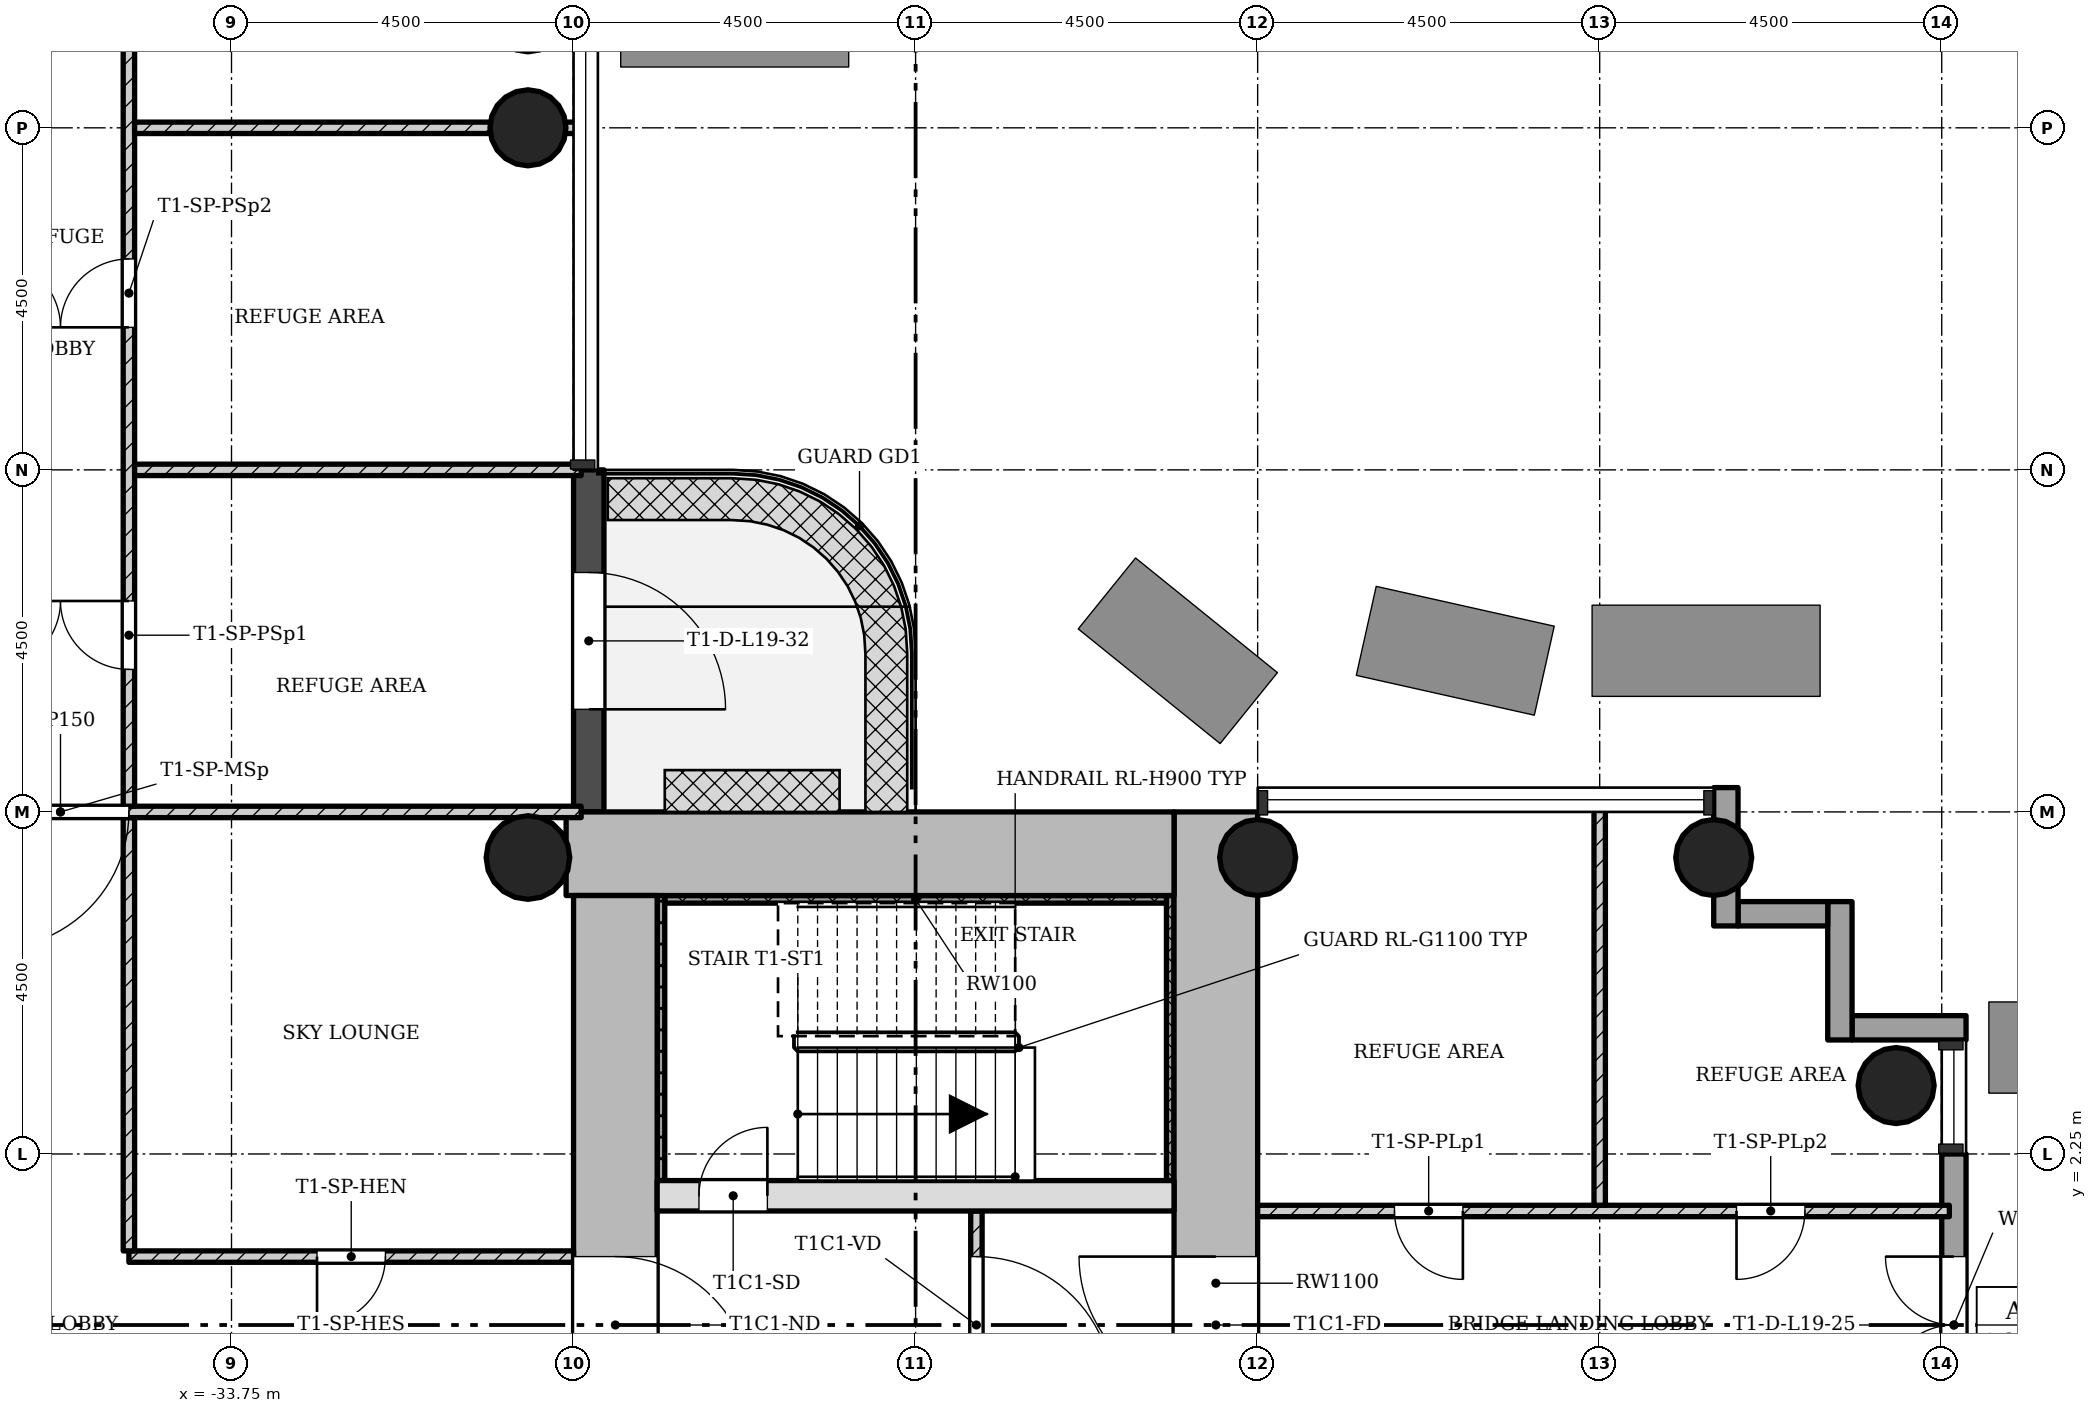
"""IFC4 building model, lengths in metres.
Left out: names, types, materials, properties, quantities, classifications, styles, units other than length and angle.
Written with IfcOpenShell. Run it as: python <this file> out.ifc"""

import sys

from ifc_helpers import new_model, si_unit, direction, frame, frame_2d, origin, origin_2d, place, context, subcontext, project, spatial, rectangle, hollow_circle, extrude, element, fill, save


model = new_model("IFC4")
c1 = context("Model", 3, precision=1e-05, world=origin(), true_north=direction((0.0, 1.0)))
c2 = subcontext(c1, "Body", "Model", "MODEL_VIEW")
j1 = project(units=[si_unit("LENGTHUNIT", "METRE"), si_unit("PLANEANGLEUNIT", "RADIAN")], contexts=[c1])
p1 = place(None, origin())
s1 = spatial("IfcSite", under=j1, at=p1, CompositionType="ELEMENT")
p2 = place(p1, origin())
s2 = spatial("IfcBuilding", under=s1, at=p2, CompositionType="ELEMENT")
p3 = place(p2, frame((0.0, 0.0, 72.1)))
s3 = spatial("IfcBuildingStorey", under=s2, at=p3, CompositionType="ELEMENT", Elevation=72.1)
p4 = place(p3, frame((-20.8, -5.65, 0.0), z_axis=(0.0, 0.0, 1.0), x_axis=(0.0, 1.0, 0.0)))
e1 = element("IfcWall", 1, at=p4, inside=s3, PredefinedType="SHEAR", context=c2, shape_type="SweptSolid", body=[
    extrude(rectangle(XDim=12.4, YDim=1.1, at=frame_2d((6.2, 0.0))), origin(), (0.0, 0.0, 1.0), 4.5),
])
p5 = place(p4, frame((4.75, 0.0, 0.0)))
e2 = element("IfcOpeningElement", 2, at=p5, cuts=e1, PredefinedType="OPENING", context=c2, shape_type="SweptSolid", body=[
    extrude(rectangle(XDim=1.8, YDim=2.1, at=frame_2d((0.9, 1.05))), frame((0.0, 0.56, 0.0), z_axis=(0.0, -1.0, 0.0), x_axis=(1.0, 0.0, 0.0)), (0.0, 0.0, 1.0), 1.12),
])
p6 = place(p3, frame((-21.35, 6.2, 0.0), z_axis=(0.0, 0.0, 1.0), x_axis=(-1.0, 0.0, 0.0)))
e3 = element("IfcWall", 3, at=p6, inside=s3, PredefinedType="SHEAR", context=c2, shape_type="SweptSolid", body=[
    extrude(rectangle(XDim=7.998, YDim=1.1, at=frame_2d((3.999, 0.0))), origin(), (0.0, 0.0, 1.0), 4.5),
])
p7 = place(p3, frame((-28.7, 5.65, 0.0), z_axis=(0.0, 0.0, 1.0), x_axis=(0.0, -1.0, 0.0)))
e4 = element("IfcWall", 4, at=p7, inside=s3, PredefinedType="SHEAR", context=c2, shape_type="SweptSolid", body=[
    extrude(rectangle(XDim=12.4, YDim=1.1, at=frame_2d((6.2, 0.0))), origin(), (0.0, 0.0, 1.0), 4.5),
])
p8 = place(p7, frame((4.75, 0.0, 0.0)))
e5 = element("IfcOpeningElement", 5, at=p8, cuts=e4, PredefinedType="OPENING", context=c2, shape_type="SweptSolid", body=[
    extrude(rectangle(XDim=1.8, YDim=2.1, at=frame_2d((0.9, 1.05))), frame((0.0, 0.56, 0.0), z_axis=(0.0, -1.0, 0.0), x_axis=(1.0, 0.0, 0.0)), (0.0, 0.0, 1.0), 1.12),
])
p9 = place(p3, frame((-28.15, 1.7, 0.0), z_axis=(0.0, 0.0, 1.0), x_axis=(1.0, 0.0, 0.0)))
e6 = element("IfcWall", 6, at=p9, inside=s3, PredefinedType="SHEAR", context=c2, shape_type="SweptSolid", body=[
    extrude(rectangle(XDim=6.8, YDim=0.4, at=frame_2d((3.4, 0.0))), origin(), (0.0, 0.0, 1.0), 4.5),
])
p10 = place(p9, frame((0.55, 0.0, 0.0)))
e7 = element("IfcOpeningElement", 7, at=p10, cuts=e6, PredefinedType="OPENING", context=c2, shape_type="SweptSolid", body=[
    extrude(rectangle(XDim=0.9, YDim=2.1, at=frame_2d((0.45, 1.05))), frame((0.0, 0.21, 0.0), z_axis=(0.0, -1.0, 0.0), x_axis=(1.0, 0.0, 0.0)), (0.0, 0.0, 1.0), 0.42),
])
for number, where, z_axis, x_axis in (
    (8, (-20.25, 6.15, 0.0), (0.0, 0.0, 1.0), (1.0, 0.0, 0.0)),
    (9, (-14.25, 6.15, 0.0), (0.0, 0.0, 1.0), (1.0, 0.0, 0.0)),
    (10, (-11.85, 3.15, 0.0), (0.0, 0.0, 1.0), (1.0, 0.0, 0.0)),
    (11, (-29.85, 15.75, 0.0), (0.0, 0.0, 1.0), (1.0, 0.0, 0.0)),
):
    element("IfcColumn", number, at=place(p3, frame(where, z_axis=z_axis, x_axis=x_axis)), inside=s3, PredefinedType="COLUMN", context=c2, shape_type="SweptSolid", body=[
        extrude(hollow_circle(Radius=0.5, WallThickness=0.036, at=origin_2d()), origin(), (0.0, 0.0, 1.0), 4.5),
    ])
p11 = place(p3, frame((-29.85, 6.15, 0.0), z_axis=(0.0, 0.0, 1.0), x_axis=(1.0, 0.0, 0.0)))
e12 = element("IfcColumn", 12, at=p11, inside=s3, PredefinedType="COLUMN", context=c2, shape_type="SweptSolid", body=[
    extrude(hollow_circle(Radius=0.55, WallThickness=0.04, at=origin_2d()), origin(), (0.0, 0.0, 1.0), 4.5),
])
p12 = place(p3, frame((-11.09, -2.25, -0.12), z_axis=(0.0, 0.0, 1.0), x_axis=(0.0, 1.0, 0.0)))
e13 = element("IfcWall", 13, at=p12, inside=s3, PredefinedType="STANDARD", context=c2, shape_type="SweptSolid", body=[
    extrude(rectangle(XDim=4.5, YDim=0.32, at=frame_2d((2.25, 0.0))), origin(), (0.0, 0.0, 1.0), 4.32),
])
p13 = place(p12, frame((1.35, 0.0, 0.0)))
e14 = element("IfcOpeningElement", 14, at=p13, cuts=e13, PredefinedType="OPENING", context=c2, shape_type="SweptSolid", body=[
    extrude(rectangle(XDim=1.8, YDim=2.1, at=frame_2d((0.9, 1.05))), frame((0.0, 0.17, 0.0), z_axis=(0.0, -1.0, 0.0), x_axis=(1.0, 0.0, 0.0)), (0.0, 0.0, 1.0), 0.34),
])
p14 = place(p3, frame((-10.93, 3.91, -0.3), z_axis=(0.0, 0.0, 1.0), x_axis=(-1.0, 0.0, 0.0)))
e15 = element("IfcWall", 15, at=p14, inside=s3, PredefinedType="STANDARD", context=c2, shape_type="SweptSolid", body=[
    extrude(rectangle(XDim=1.5, YDim=0.32, at=frame_2d((0.75, 0.0))), origin(), (0.0, 0.0, 1.0), 4.5),
])
p15 = place(p3, frame((-12.59, 3.75, -0.3), z_axis=(0.0, 0.0, 1.0), x_axis=(0.0, 1.0, 0.0)))
e16 = element("IfcWall", 16, at=p15, inside=s3, PredefinedType="STANDARD", context=c2, shape_type="SweptSolid", body=[
    extrude(rectangle(XDim=1.82, YDim=0.32, at=frame_2d((0.91, 0.0))), origin(), (0.0, 0.0, 1.0), 4.5),
])
p16 = place(p3, frame((-12.75, 5.41, -0.3), z_axis=(0.0, 0.0, 1.0), x_axis=(-1.0, 0.0, 0.0)))
e17 = element("IfcWall", 17, at=p16, inside=s3, PredefinedType="STANDARD", context=c2, shape_type="SweptSolid", body=[
    extrude(rectangle(XDim=1.18, YDim=0.32, at=frame_2d((0.59, 0.0))), origin(), (0.0, 0.0, 1.0), 4.5),
])
p17 = place(p3, frame((-14.09, 5.25, -0.3), z_axis=(0.0, 0.0, 1.0), x_axis=(0.0, 1.0, 0.0)))
e18 = element("IfcWall", 18, at=p17, inside=s3, PredefinedType="STANDARD", context=c2, shape_type="SweptSolid", body=[
    extrude(rectangle(XDim=1.82, YDim=0.32, at=frame_2d((0.91, 0.0))), origin(), (0.0, 0.0, 1.0), 4.5),
])
p18 = place(p3, frame((-29.05, 6.75, -0.02), z_axis=(0.0, 0.0, 1.0), x_axis=(0.0, 1.0, 0.0)))
e19 = element("IfcWall", 19, at=p18, inside=s3, PredefinedType="STANDARD", context=c2, shape_type="SweptSolid", body=[
    extrude(rectangle(XDim=4.5, YDim=0.4, at=frame_2d((2.25, 0.0))), origin(), (0.0, 0.0, 1.0), 4.22),
])
p19 = place(p18, frame((1.35, 0.0, 0.02)))
e20 = element("IfcOpeningElement", 20, at=p19, cuts=e19, PredefinedType="OPENING", context=c2, shape_type="SweptSolid", body=[
    extrude(rectangle(XDim=1.8, YDim=2.1, at=frame_2d((0.9, 1.05))), frame((0.0, 0.21, 0.0), z_axis=(0.0, -1.0, 0.0), x_axis=(1.0, 0.0, 0.0)), (0.0, 0.0, 1.0), 0.42),
])
p20 = place(p3, frame((-23.95, -1.5, 0.0), z_axis=(0.0, 0.0, 1.0), x_axis=(0.0, 1.0, 0.0)))
e21 = element("IfcWall", 21, at=p20, inside=s3, PredefinedType="PARTITIONING", context=c2, shape_type="SweptSolid", body=[
    extrude(rectangle(XDim=3.0, YDim=0.15, at=frame_2d((1.5, 0.0))), origin(), (0.0, 0.0, 1.0), 4.08),
])
p21 = place(p20, frame((0.6, 0.0, 0.0)))
e22 = element("IfcOpeningElement", 22, at=p21, cuts=e21, PredefinedType="OPENING", context=c2, shape_type="SweptSolid", body=[
    extrude(rectangle(XDim=1.8, YDim=2.1, at=frame_2d((0.9, 1.05))), frame((0.0, 0.085, 0.0), z_axis=(0.0, -1.0, 0.0), x_axis=(1.0, 0.0, 0.0)), (0.0, 0.0, 1.0), 0.17),
])
p22 = place(p3, frame((-35.1, 0.9, 0.0), z_axis=(0.0, 0.0, 1.0), x_axis=(1.0, 0.0, 0.0)))
e23 = element("IfcWall", 23, at=p22, inside=s3, PredefinedType="PARTITIONING", context=c2, shape_type="SweptSolid", body=[
    extrude(rectangle(XDim=5.85, YDim=0.15, at=frame_2d((2.925, 0.0))), origin(), (0.0, 0.0, 1.0), 4.08),
])
p23 = place(p22, frame((2.475, 0.0, 0.0)))
e24 = element("IfcOpeningElement", 24, at=p23, cuts=e23, PredefinedType="OPENING", context=c2, shape_type="SweptSolid", body=[
    extrude(rectangle(XDim=0.9, YDim=2.1, at=frame_2d((0.45, 1.05))), frame((0.0, 0.085, 0.0), z_axis=(0.0, -1.0, 0.0), x_axis=(1.0, 0.0, 0.0)), (0.0, 0.0, 1.0), 0.17),
])
p24 = place(p3, frame((-35.1, 0.975, 0.0), z_axis=(0.0, 0.0, 1.0), x_axis=(0.0, 1.0, 0.0)))
e25 = element("IfcWall", 25, at=p24, inside=s3, PredefinedType="PARTITIONING", context=c2, shape_type="SweptSolid", body=[
    extrude(rectangle(XDim=5.7, YDim=0.15, at=frame_2d((2.85, 0.0))), origin(), (0.0, 0.0, 1.0), 4.08),
])
p25 = place(p3, frame((-20.25, 1.5, 0.0), z_axis=(0.0, 0.0, 1.0), x_axis=(1.0, 0.0, 0.0)))
e26 = element("IfcWall", 26, at=p25, inside=s3, PredefinedType="PARTITIONING", context=c2, shape_type="SweptSolid", body=[
    extrude(rectangle(XDim=9.1, YDim=0.15, at=frame_2d((4.55, 0.0))), origin(), (0.0, 0.0, 1.0), 4.08),
])
p26 = place(p25, frame((1.8, 0.0, 0.0)))
e27 = element("IfcOpeningElement", 27, at=p26, cuts=e26, PredefinedType="OPENING", context=c2, shape_type="SweptSolid", body=[
    extrude(rectangle(XDim=0.9, YDim=2.1, at=frame_2d((0.45, 1.05))), frame((0.0, 0.085, 0.0), z_axis=(0.0, -1.0, 0.0), x_axis=(1.0, 0.0, 0.0)), (0.0, 0.0, 1.0), 0.17),
])
p27 = place(p25, frame((6.3, 0.0, 0.0)))
e28 = element("IfcOpeningElement", 28, at=p27, cuts=e26, PredefinedType="OPENING", context=c2, shape_type="SweptSolid", body=[
    extrude(rectangle(XDim=0.9, YDim=2.1, at=frame_2d((0.45, 1.05))), frame((0.0, 0.085, 0.0), z_axis=(0.0, -1.0, 0.0), x_axis=(1.0, 0.0, 0.0)), (0.0, 0.0, 1.0), 0.17),
])
p28 = place(p3, frame((-15.75, 1.575, 0.0), z_axis=(0.0, 0.0, 1.0), x_axis=(0.0, 1.0, 0.0)))
e29 = element("IfcWall", 29, at=p28, inside=s3, PredefinedType="PARTITIONING", context=c2, shape_type="SweptSolid", body=[
    extrude(rectangle(XDim=5.275, YDim=0.15, at=frame_2d((2.638, 0.0))), origin(), (0.0, 0.0, 1.0), 4.08),
])
p29 = place(p3, frame((-42.85, 6.75, 0.0), z_axis=(0.0, 0.0, 1.0), x_axis=(1.0, 0.0, 0.0)))
e30 = element("IfcWall", 30, at=p29, inside=s3, PredefinedType="PARTITIONING", context=c2, shape_type="SweptSolid", body=[
    extrude(rectangle(XDim=13.7, YDim=0.15, at=frame_2d((6.85, 0.0))), origin(), (0.0, 0.0, 1.0), 4.08),
])
p30 = place(p29, frame((5.95, 0.0, 0.0)))
e31 = element("IfcOpeningElement", 31, at=p30, cuts=e30, PredefinedType="OPENING", context=c2, shape_type="SweptSolid", body=[
    extrude(rectangle(XDim=1.8, YDim=2.1, at=frame_2d((0.9, 1.05))), frame((0.0, 0.085, 0.0), z_axis=(0.0, -1.0, 0.0), x_axis=(1.0, 0.0, 0.0)), (0.0, 0.0, 1.0), 0.17),
])
p31 = place(p3, frame((-35.1, 6.825, 0.0), z_axis=(0.0, 0.0, 1.0), x_axis=(0.0, 1.0, 0.0)))
e32 = element("IfcWall", 32, at=p31, inside=s3, PredefinedType="PARTITIONING", context=c2, shape_type="SweptSolid", body=[
    extrude(rectangle(XDim=13.525, YDim=0.15, at=frame_2d((6.763, 0.0))), origin(), (0.0, 0.0, 1.0), 4.08),
])
p32 = place(p31, frame((1.8, 0.0, 0.0)))
e33 = element("IfcOpeningElement", 33, at=p32, cuts=e32, PredefinedType="OPENING", context=c2, shape_type="SweptSolid", body=[
    extrude(rectangle(XDim=0.9, YDim=2.1, at=frame_2d((0.45, 1.05))), frame((0.0, 0.085, 0.0), z_axis=(0.0, -1.0, 0.0), x_axis=(1.0, 0.0, 0.0)), (0.0, 0.0, 1.0), 0.17),
])
p33 = place(p31, frame((6.3, 0.0, 0.0)))
e34 = element("IfcOpeningElement", 34, at=p33, cuts=e32, PredefinedType="OPENING", context=c2, shape_type="SweptSolid", body=[
    extrude(rectangle(XDim=0.9, YDim=2.1, at=frame_2d((0.45, 1.05))), frame((0.0, 0.085, 0.0), z_axis=(0.0, -1.0, 0.0), x_axis=(1.0, 0.0, 0.0)), (0.0, 0.0, 1.0), 0.17),
])
p34 = place(p31, frame((10.8, 0.0, 0.0)))
e35 = element("IfcOpeningElement", 35, at=p34, cuts=e32, PredefinedType="OPENING", context=c2, shape_type="SweptSolid", body=[
    extrude(rectangle(XDim=0.9, YDim=2.1, at=frame_2d((0.45, 1.05))), frame((0.0, 0.085, 0.0), z_axis=(0.0, -1.0, 0.0), x_axis=(1.0, 0.0, 0.0)), (0.0, 0.0, 1.0), 0.17),
])
for number, where, z_axis, x_axis in (
    (36, (-35.025, 11.25, 0.0), (0.0, 0.0, 1.0), (1.0, 0.0, 0.0)),
    (37, (-35.025, 15.75, 0.0), (0.0, 0.0, 1.0), (1.0, 0.0, 0.0)),
):
    element("IfcWall", number, at=place(p3, frame(where, z_axis=z_axis, x_axis=x_axis)), inside=s3, PredefinedType="PARTITIONING", context=c2, shape_type="SweptSolid", body=[
        extrude(rectangle(XDim=5.875, YDim=0.15, at=frame_2d((2.938, 0.0))), origin(), (0.0, 0.0, 1.0), 4.08),
    ])
p35 = place(p3, frame((-21.4, 1.9, 0.0), z_axis=(0.0, 0.0, 1.0), x_axis=(0.0, 1.0, 0.0)))
e38 = element("IfcWall", 38, at=p35, inside=s3, PredefinedType="SHEAR", context=c2, shape_type="SweptSolid", body=[
    extrude(rectangle(XDim=3.75, YDim=0.1, at=frame_2d((1.875, 0.0))), origin(), (0.0, 0.0, 1.0), 4.5),
])
p36 = place(p3, frame((-28.05, 5.6, 0.0), z_axis=(0.0, 0.0, 1.0), x_axis=(1.0, 0.0, 0.0)))
e39 = element("IfcWall", 39, at=p36, inside=s3, PredefinedType="SHEAR", context=c2, shape_type="SweptSolid", body=[
    extrude(rectangle(XDim=6.6, YDim=0.1, at=frame_2d((3.3, 0.0))), origin(), (0.0, 0.0, 1.0), 4.5),
])
p37 = place(p3, frame((-28.1, 1.9, 0.0), z_axis=(0.0, 0.0, 1.0), x_axis=(0.0, 1.0, 0.0)))
e40 = element("IfcWall", 40, at=p37, inside=s3, PredefinedType="SHEAR", context=c2, shape_type="SweptSolid", body=[
    extrude(rectangle(XDim=3.75, YDim=0.1, at=frame_2d((1.875, 0.0))), origin(), (0.0, 0.0, 1.0), 4.5),
])
p38 = place(p13, origin())
e41 = element("IfcDoor", 41, at=p38, inside=s3, OperationType="DOUBLE_DOOR_SINGLE_SWING", PredefinedType="DOOR", context=c2, shape_type="SweptSolid", body=[
    extrude(rectangle(XDim=1.8, YDim=2.1, at=frame_2d((0.9, 1.05))), frame((0.0, 0.025, 0.0), z_axis=(0.0, -1.0, 0.0), x_axis=(1.0, 0.0, 0.0)), (0.0, 0.0, 1.0), 0.05),
])
fill(e14, e41)
p39 = place(p19, origin())
e42 = element("IfcDoor", 42, at=p39, inside=s3, OperationType="SINGLE_SWING_LEFT", PredefinedType="DOOR", context=c2, shape_type="SweptSolid", body=[
    extrude(rectangle(XDim=1.8, YDim=2.1, at=frame_2d((0.9, 1.05))), frame((0.0, 0.025, 0.0), z_axis=(0.0, -1.0, 0.0), x_axis=(1.0, 0.0, 0.0)), (0.0, 0.0, 1.0), 0.05),
])
fill(e20, e42)
p40 = place(p21, origin())
e43 = element("IfcDoor", 43, at=p40, inside=s3, OperationType="SINGLE_SWING_LEFT", PredefinedType="DOOR", context=c2, shape_type="SweptSolid", body=[
    extrude(rectangle(XDim=1.8, YDim=2.1, at=frame_2d((0.9, 1.05))), frame((0.0, 0.025, 0.0), z_axis=(0.0, -1.0, 0.0), x_axis=(1.0, 0.0, 0.0)), (0.0, 0.0, 1.0), 0.05),
])
fill(e22, e43)
p41 = place(p23, origin())
e44 = element("IfcDoor", 44, at=p41, inside=s3, OperationType="SINGLE_SWING_LEFT", PredefinedType="DOOR", context=c2, shape_type="SweptSolid", body=[
    extrude(rectangle(XDim=0.9, YDim=2.1, at=frame_2d((0.45, 1.05))), frame((0.0, 0.025, 0.0), z_axis=(0.0, -1.0, 0.0), x_axis=(1.0, 0.0, 0.0)), (0.0, 0.0, 1.0), 0.05),
])
fill(e24, e44)
p42 = place(p26, origin())
e45 = element("IfcDoor", 45, at=p42, inside=s3, OperationType="SINGLE_SWING_RIGHT", PredefinedType="DOOR", context=c2, shape_type="SweptSolid", body=[
    extrude(rectangle(XDim=0.9, YDim=2.1, at=frame_2d((0.45, 1.05))), frame((0.0, 0.025, 0.0), z_axis=(0.0, -1.0, 0.0), x_axis=(1.0, 0.0, 0.0)), (0.0, 0.0, 1.0), 0.05),
])
fill(e27, e45)
p43 = place(p27, origin())
e46 = element("IfcDoor", 46, at=p43, inside=s3, OperationType="SINGLE_SWING_LEFT", PredefinedType="DOOR", context=c2, shape_type="SweptSolid", body=[
    extrude(rectangle(XDim=0.9, YDim=2.1, at=frame_2d((0.45, 1.05))), frame((0.0, 0.025, 0.0), z_axis=(0.0, -1.0, 0.0), x_axis=(1.0, 0.0, 0.0)), (0.0, 0.0, 1.0), 0.05),
])
fill(e28, e46)
p44 = place(p30, origin())
e47 = element("IfcDoor", 47, at=p44, inside=s3, OperationType="SINGLE_SWING_LEFT", PredefinedType="DOOR", context=c2, shape_type="SweptSolid", body=[
    extrude(rectangle(XDim=1.8, YDim=2.1, at=frame_2d((0.9, 1.05))), frame((0.0, 0.025, 0.0), z_axis=(0.0, -1.0, 0.0), x_axis=(1.0, 0.0, 0.0)), (0.0, 0.0, 1.0), 0.05),
])
fill(e31, e47)
p45 = place(p32, origin())
e48 = element("IfcDoor", 48, at=p45, inside=s3, OperationType="SINGLE_SWING_LEFT", PredefinedType="DOOR", context=c2, shape_type="SweptSolid", body=[
    extrude(rectangle(XDim=0.9, YDim=2.1, at=frame_2d((0.45, 1.05))), frame((0.0, 0.025, 0.0), z_axis=(0.0, -1.0, 0.0), x_axis=(1.0, 0.0, 0.0)), (0.0, 0.0, 1.0), 0.05),
])
fill(e33, e48)
p46 = place(p33, origin())
e49 = element("IfcDoor", 49, at=p46, inside=s3, OperationType="SINGLE_SWING_RIGHT", PredefinedType="DOOR", context=c2, shape_type="SweptSolid", body=[
    extrude(rectangle(XDim=0.9, YDim=2.1, at=frame_2d((0.45, 1.05))), frame((0.0, 0.025, 0.0), z_axis=(0.0, -1.0, 0.0), x_axis=(1.0, 0.0, 0.0)), (0.0, 0.0, 1.0), 0.05),
])
fill(e34, e49)
p47 = place(p10, origin())
e50 = element("IfcDoor", 50, at=p47, inside=s3, OperationType="SINGLE_SWING_LEFT", PredefinedType="DOOR", context=c2, shape_type="SweptSolid", body=[
    extrude(rectangle(XDim=0.9, YDim=2.1, at=frame_2d((0.45, 1.05))), frame((0.0, 0.025, 0.0), z_axis=(0.0, -1.0, 0.0), x_axis=(1.0, 0.0, 0.0)), (0.0, 0.0, 1.0), 0.05),
])
fill(e7, e50)
p48 = place(p8, origin())
e51 = element("IfcDoor", 51, at=p48, inside=s3, OperationType="SINGLE_SWING_LEFT", PredefinedType="DOOR", context=c2, shape_type="SweptSolid", body=[
    extrude(rectangle(XDim=1.8, YDim=2.1, at=frame_2d((0.9, 1.05))), frame((0.0, 0.025, 0.0), z_axis=(0.0, -1.0, 0.0), x_axis=(1.0, 0.0, 0.0)), (0.0, 0.0, 1.0), 0.05),
])
fill(e5, e51)
p49 = place(p5, origin())
e52 = element("IfcDoor", 52, at=p49, inside=s3, OperationType="SINGLE_SWING_LEFT", PredefinedType="DOOR", context=c2, shape_type="SweptSolid", body=[
    extrude(rectangle(XDim=1.8, YDim=2.1, at=frame_2d((0.9, 1.05))), frame((0.0, 0.025, 0.0), z_axis=(0.0, -1.0, 0.0), x_axis=(1.0, 0.0, 0.0)), (0.0, 0.0, 1.0), 0.05),
])
fill(e2, e52)
save(model, sys.argv[1])
